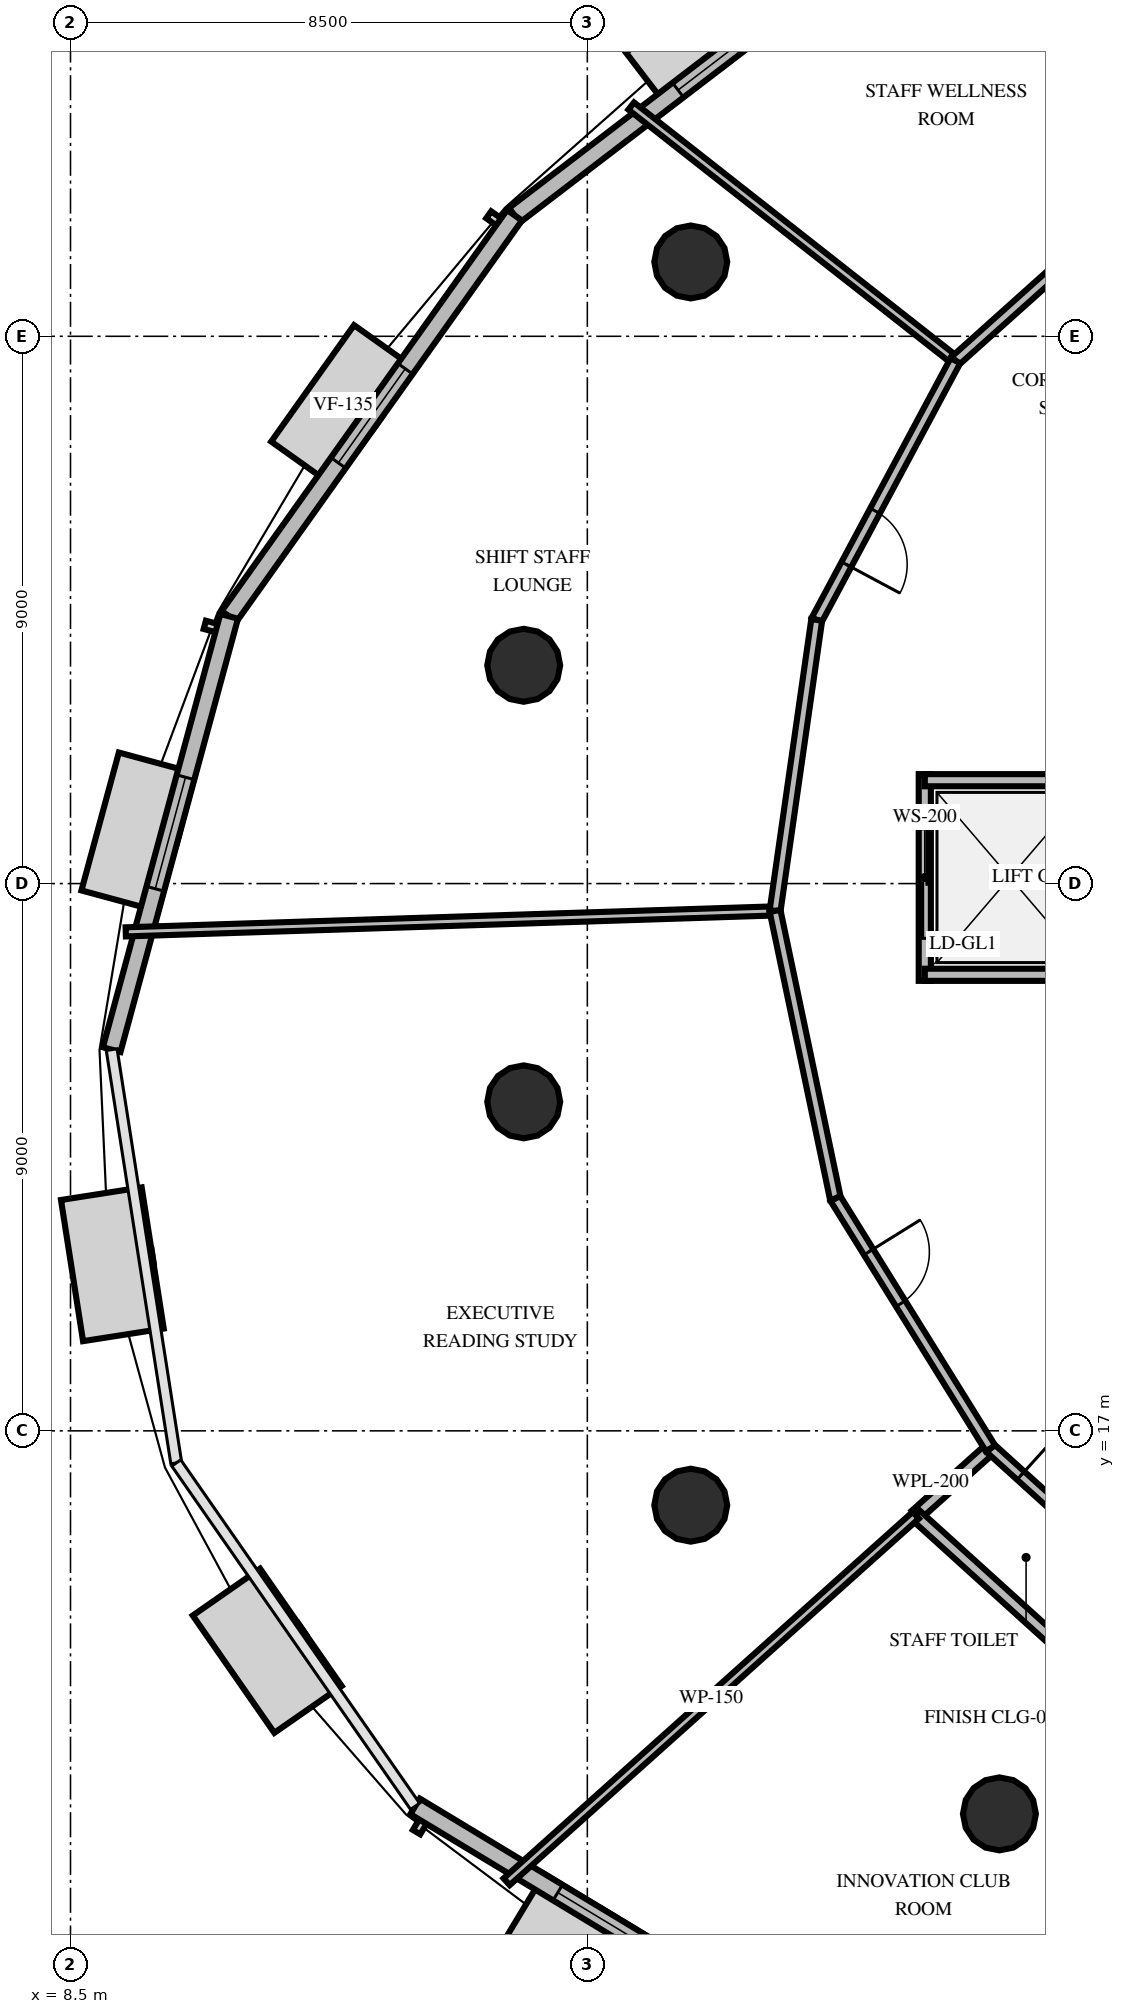
"""IFC4 building model, lengths in metres.
Left out: names, types, materials, properties, quantities, classifications, styles, units other than length and angle.
Written with IfcOpenShell. Run it as: python <this file> out.ifc"""

import sys

from ifc_helpers import new_model, si_unit, direction, frame, frame_2d, origin, origin_2d, place, context, subcontext, project, spatial, rectangle, circle, extrude, element, fill, save


model = new_model("IFC4")
c1 = context("Model", 3, precision=1e-05, world=origin(), true_north=direction((0.0, 1.0)))
c2 = subcontext(c1, "Body", "Model", "MODEL_VIEW")
j1 = project(units=[si_unit("LENGTHUNIT", "METRE"), si_unit("PLANEANGLEUNIT", "RADIAN")], contexts=[c1])
p1 = place(None, origin())
s1 = spatial("IfcSite", under=j1, at=p1, CompositionType="ELEMENT")
p2 = place(p1, origin())
s2 = spatial("IfcBuilding", under=s1, at=p2, CompositionType="ELEMENT")
p3 = place(p2, frame((0.0, 0.0, 125.8)))
s3 = spatial("IfcBuildingStorey", under=s2, at=p3, CompositionType="ELEMENT", Elevation=125.8)
for number, where, z_axis, x_axis in (
    (1, (18.701, 36.222, 0.0), (0.0, 0.0, 1.0), (1.0, 0.0, 0.0)),
    (2, (15.954, 29.59, 0.0), (0.0, 0.0, 1.0), (1.0, 0.0, 0.0)),
    (3, (15.954, 22.41, 0.0), (0.0, 0.0, 1.0), (1.0, 0.0, 0.0)),
    (4, (18.701, 15.778, 0.0), (0.0, 0.0, 1.0), (1.0, 0.0, 0.0)),
    (5, (23.778, 10.701, 0.0), (0.0, 0.0, 1.0), (1.0, 0.0, 0.0)),
):
    element("IfcColumn", number, at=place(p3, frame(where, z_axis=z_axis, x_axis=x_axis)), inside=s3, PredefinedType="COLUMN", context=c2, shape_type="SweptSolid", body=[
        extrude(circle(Radius=0.6, at=origin_2d()), origin(), (0.0, 0.0, 1.0), 4.0),
    ])
p4 = place(p3, frame((22.69, 42.261, 0.0), z_axis=(0.0, 0.0, 1.0), x_axis=(-0.794200404565, -0.607655920229, 0.0)))
e6 = element("IfcWall", 6, at=p4, inside=s3, PredefinedType="SOLIDWALL", context=c2, shape_type="SweptSolid", body=[
    extrude(rectangle(XDim=8.673, YDim=0.3, at=frame_2d((4.336, 0.0))), origin(), (0.0, 0.0, 1.0), 2.9),
])
p5 = place(p4, frame((3.386, 0.0, 0.8)))
e7 = element("IfcOpeningElement", 7, at=p5, cuts=e6, PredefinedType="OPENING", context=c2, shape_type="SweptSolid", body=[
    extrude(rectangle(XDim=1.9, YDim=1.95, at=frame_2d((0.95, 0.975))), frame((0.0, 0.16, 0.0), z_axis=(0.0, -1.0, 0.0), x_axis=(1.0, 0.0, 0.0)), (0.0, 0.0, 1.0), 0.32),
])
p6 = place(p3, frame((15.802, 36.991, 0.0), z_axis=(0.0, 0.0, 1.0), x_axis=(-0.579736538908, -0.814803992047, 0.0)))
e8 = element("IfcWall", 8, at=p6, inside=s3, PredefinedType="SOLIDWALL", context=c2, shape_type="SweptSolid", body=[
    extrude(rectangle(XDim=8.095, YDim=0.3, at=frame_2d((4.047, 0.0))), origin(), (0.0, 0.0, 1.0), 2.9),
])
p7 = place(p6, frame((3.098, 0.0, 0.8)))
e9 = element("IfcOpeningElement", 9, at=p7, cuts=e8, PredefinedType="OPENING", context=c2, shape_type="SweptSolid", body=[
    extrude(rectangle(XDim=1.9, YDim=1.95, at=frame_2d((0.95, 0.975))), frame((0.0, 0.16, 0.0), z_axis=(0.0, -1.0, 0.0), x_axis=(1.0, 0.0, 0.0)), (0.0, 0.0, 1.0), 0.32),
])
p8 = place(p3, frame((11.109, 30.395, 0.0), z_axis=(0.0, 0.0, 1.0), x_axis=(-0.261681809646, -0.965154200374, 0.0)))
e10 = element("IfcWall", 10, at=p8, inside=s3, PredefinedType="SOLIDWALL", context=c2, shape_type="SweptSolid", body=[
    extrude(rectangle(XDim=7.384, YDim=0.3, at=frame_2d((3.692, 0.0))), origin(), (0.0, 0.0, 1.0), 2.9),
])
p9 = place(p8, frame((2.742, 0.0, 0.8)))
e11 = element("IfcOpeningElement", 11, at=p9, cuts=e10, PredefinedType="OPENING", context=c2, shape_type="SweptSolid", body=[
    extrude(rectangle(XDim=1.9, YDim=1.95, at=frame_2d((0.95, 0.975))), frame((0.0, 0.16, 0.0), z_axis=(0.0, -1.0, 0.0), x_axis=(1.0, 0.0, 0.0)), (0.0, 0.0, 1.0), 0.32),
])
p10 = place(p3, frame((14.167, 10.825, 0.0), z_axis=(0.0, 0.0, 1.0), x_axis=(0.856004258132, -0.516968770875, 0.0)))
e12 = element("IfcWall", 12, at=p10, inside=s3, PredefinedType="SOLIDWALL", context=c2, shape_type="SweptSolid", body=[
    extrude(rectangle(XDim=7.383, YDim=0.3, at=frame_2d((3.692, 0.0))), origin(), (0.0, 0.0, 1.0), 2.9),
])
p11 = place(p10, frame((2.742, 0.0, 0.8)))
e13 = element("IfcOpeningElement", 13, at=p11, cuts=e12, PredefinedType="OPENING", context=c2, shape_type="SweptSolid", body=[
    extrude(rectangle(XDim=1.9, YDim=1.95, at=frame_2d((0.95, 0.975))), frame((0.0, 0.16, 0.0), z_axis=(0.0, -1.0, 0.0), x_axis=(1.0, 0.0, 0.0)), (0.0, 0.0, 1.0), 0.32),
])
p12 = place(p3, frame((22.55, 24.4, 0.0), z_axis=(0.0, 0.0, 1.0), x_axis=(0.0, 1.0, 0.0)))
e14 = element("IfcWall", 14, at=p12, inside=s3, PredefinedType="SOLIDWALL", context=c2, shape_type="SweptSolid", body=[
    extrude(rectangle(XDim=3.4, YDim=0.2, at=frame_2d((1.7, 0.0))), origin(), (0.0, 0.0, 1.0), 2.8),
])
p13 = place(p12, frame((0.7, 0.0, 0.0)))
e15 = element("IfcOpeningElement", 15, at=p13, cuts=e14, PredefinedType="OPENING", context=c2, shape_type="SweptSolid", body=[
    extrude(rectangle(XDim=1.8, YDim=2.4, at=frame_2d((0.9, 1.2))), frame((0.0, 0.11, 0.0), z_axis=(0.0, -1.0, 0.0), x_axis=(1.0, 0.0, 0.0)), (0.0, 0.0, 1.0), 0.22),
])
for number, where, z_axis, x_axis in (
    (16, (22.55, 24.5, 0.0), (0.0, 0.0, 1.0), (1.0, 0.0, 0.0)),
    (17, (22.55, 27.7, 0.0), (0.0, 0.0, 1.0), (1.0, 0.0, 0.0)),
):
    element("IfcWall", number, at=place(p3, frame(where, z_axis=z_axis, x_axis=x_axis)), inside=s3, PredefinedType="SOLIDWALL", context=c2, shape_type="SweptSolid", body=[
        extrude(rectangle(XDim=2.8, YDim=0.2, at=frame_2d((1.4, 0.0))), origin(), (0.0, 0.0, 1.0), 2.8),
    ])
p14 = place(p3, frame((23.631, 16.713, 0.0), z_axis=(0.0, 0.0, 1.0), x_axis=(-0.744881296244, -0.667197013262, 0.0)))
e18 = element("IfcWall", 18, at=p14, inside=s3, PredefinedType="PLUMBINGWALL", context=c2, shape_type="SweptSolid", body=[
    extrude(rectangle(XDim=1.65, YDim=0.2, at=frame_2d((0.825, 0.0))), origin(), (0.0, 0.0, 1.0), 2.8),
])
p15 = place(p3, frame((22.402, 15.612, 0.0), z_axis=(0.0, 0.0, 1.0), x_axis=(0.741336734145, -0.671133255477, 0.0)))
e19 = element("IfcWall", 19, at=p15, inside=s3, PredefinedType="PLUMBINGWALL", context=c2, shape_type="SweptSolid", body=[
    extrude(rectangle(XDim=3.255, YDim=0.2, at=frame_2d((1.627, 0.0))), origin(), (0.0, 0.0, 1.0), 2.8),
])
p16 = place(p3, frame((23.631, 16.713, 0.0), z_axis=(0.0, 0.0, 1.0), x_axis=(0.741384706551, -0.671080261141, 0.0)))
e20 = element("IfcWall", 20, at=p16, inside=s3, PredefinedType="PARTITIONING", context=c2, shape_type="SweptSolid", body=[
    extrude(rectangle(XDim=2.91, YDim=0.18, at=frame_2d((1.455, 0.0))), origin(), (0.0, 0.0, 1.0), 2.8),
])
p17 = place(p16, frame((0.669, 0.0, 0.0)))
e21 = element("IfcOpeningElement", 21, at=p17, cuts=e20, PredefinedType="OPENING", context=c2, shape_type="SweptSolid", body=[
    extrude(rectangle(XDim=0.92, YDim=2.1, at=frame_2d((0.46, 1.05))), frame((0.0, 0.1, 0.0), z_axis=(0.0, -1.0, 0.0), x_axis=(1.0, 0.0, 0.0)), (0.0, 0.0, 1.0), 0.2),
])
p18 = place(p3, frame((22.402, 15.612, 0.0), z_axis=(0.0, 0.0, 1.0), x_axis=(-0.744885698321, -0.667192098602, 0.0)))
e22 = element("IfcWall", 22, at=p18, inside=s3, PredefinedType="PARTITIONING", context=c2, shape_type="SweptSolid", body=[
    extrude(rectangle(XDim=9.034, YDim=0.15, at=frame_2d((4.517, 0.0))), origin(), (0.0, 0.0, 1.0), 2.8),
])
p19 = place(p3, frame((23.053, 34.599, 0.0), z_axis=(0.0, 0.0, 1.0), x_axis=(-0.786392054324, 0.61772772068, 0.0)))
e23 = element("IfcWall", 23, at=p19, inside=s3, PredefinedType="PARTITIONING", context=c2, shape_type="SweptSolid", body=[
    extrude(rectangle(XDim=6.78, YDim=0.15, at=frame_2d((3.39, 0.0))), origin(), (0.0, 0.0, 1.0), 2.8),
])
p20 = place(p3, frame((26.655, 37.824, 0.0), z_axis=(0.0, 0.0, 1.0), x_axis=(-0.744874027172, -0.66720512861, 0.0)))
e24 = element("IfcWall", 24, at=p20, inside=s3, PredefinedType="PARTITIONING", context=c2, shape_type="SweptSolid", body=[
    extrude(rectangle(XDim=4.834, YDim=0.18, at=frame_2d((2.417, 0.0))), origin(), (0.0, 0.0, 1.0), 2.8),
])
p21 = place(p3, frame((20.087, 25.551, 0.0), z_axis=(0.0, 0.0, 1.0), x_axis=(-0.999479353963, -0.03226485706, 0.0)))
e25 = element("IfcWall", 25, at=p21, inside=s3, PredefinedType="PARTITIONING", context=c2, shape_type="SweptSolid", body=[
    extrude(rectangle(XDim=10.684, YDim=0.15, at=frame_2d((5.342, 0.0))), origin(), (0.0, 0.0, 1.0), 2.8),
])
p22 = place(p3, frame((23.053, 34.599, 0.0), z_axis=(0.0, 0.0, 1.0), x_axis=(-0.4717883109, -0.881711851853, 0.0)))
e26 = element("IfcWall", 26, at=p22, inside=s3, PredefinedType="PARTITIONING", context=c2, shape_type="SweptSolid", body=[
    extrude(rectangle(XDim=4.834, YDim=0.18, at=frame_2d((2.417, 0.0))), origin(), (0.0, 0.0, 1.0), 2.8),
])
p23 = place(p22, frame((2.801, 0.0, 0.0)))
e27 = element("IfcOpeningElement", 27, at=p23, cuts=e26, PredefinedType="OPENING", context=c2, shape_type="SweptSolid", body=[
    extrude(rectangle(XDim=1.0, YDim=2.15, at=frame_2d((0.5, 1.075))), frame((0.0, 0.1, 0.0), z_axis=(0.0, -1.0, 0.0), x_axis=(1.0, 0.0, 0.0)), (0.0, 0.0, 1.0), 0.2),
])
p24 = place(p3, frame((20.773, 30.336, 0.0), z_axis=(0.0, 0.0, 1.0), x_axis=(-0.141753638595, -0.989901967846, 0.0)))
e28 = element("IfcWall", 28, at=p24, inside=s3, PredefinedType="PARTITIONING", context=c2, shape_type="SweptSolid", body=[
    extrude(rectangle(XDim=4.834, YDim=0.18, at=frame_2d((2.417, 0.0))), origin(), (0.0, 0.0, 1.0), 2.8),
])
p25 = place(p3, frame((20.087, 25.551, 0.0), z_axis=(0.0, 0.0, 1.0), x_axis=(0.205343584518, -0.978689946969, 0.0)))
e29 = element("IfcWall", 29, at=p25, inside=s3, PredefinedType="PARTITIONING", context=c2, shape_type="SweptSolid", body=[
    extrude(rectangle(XDim=4.834, YDim=0.18, at=frame_2d((2.417, 0.0))), origin(), (0.0, 0.0, 1.0), 2.8),
])
p26 = place(p3, frame((21.08, 20.819, 0.0), z_axis=(0.0, 0.0, 1.0), x_axis=(0.527690930955, -0.849436449293, 0.0)))
e30 = element("IfcWall", 30, at=p26, inside=s3, PredefinedType="PARTITIONING", context=c2, shape_type="SweptSolid", body=[
    extrude(rectangle(XDim=4.834, YDim=0.18, at=frame_2d((2.417, 0.0))), origin(), (0.0, 0.0, 1.0), 2.8),
])
p27 = place(p26, frame((1.034, 0.0, 0.0)))
e31 = element("IfcOpeningElement", 31, at=p27, cuts=e30, PredefinedType="OPENING", context=c2, shape_type="SweptSolid", body=[
    extrude(rectangle(XDim=1.0, YDim=2.15, at=frame_2d((0.5, 1.075))), frame((0.0, 0.1, 0.0), z_axis=(0.0, -1.0, 0.0), x_axis=(1.0, 0.0, 0.0)), (0.0, 0.0, 1.0), 0.2),
])
p28 = place(p5, origin())
e32 = element("IfcWindow", 32, at=p28, inside=s3, PartitioningType="SINGLE_PANEL", PredefinedType="WINDOW", context=c2, shape_type="SweptSolid", body=[
    extrude(rectangle(XDim=1.9, YDim=1.95, at=frame_2d((0.95, 0.975))), frame((0.0, 0.03, 0.0), z_axis=(0.0, -1.0, 0.0), x_axis=(1.0, 0.0, 0.0)), (0.0, 0.0, 1.0), 0.06),
])
fill(e7, e32)
p29 = place(p7, origin())
e33 = element("IfcWindow", 33, at=p29, inside=s3, PartitioningType="SINGLE_PANEL", PredefinedType="WINDOW", context=c2, shape_type="SweptSolid", body=[
    extrude(rectangle(XDim=1.9, YDim=1.95, at=frame_2d((0.95, 0.975))), frame((0.0, 0.03, 0.0), z_axis=(0.0, -1.0, 0.0), x_axis=(1.0, 0.0, 0.0)), (0.0, 0.0, 1.0), 0.06),
])
fill(e9, e33)
p30 = place(p9, origin())
e34 = element("IfcWindow", 34, at=p30, inside=s3, PartitioningType="SINGLE_PANEL", PredefinedType="WINDOW", context=c2, shape_type="SweptSolid", body=[
    extrude(rectangle(XDim=1.9, YDim=1.95, at=frame_2d((0.95, 0.975))), frame((0.0, 0.03, 0.0), z_axis=(0.0, -1.0, 0.0), x_axis=(1.0, 0.0, 0.0)), (0.0, 0.0, 1.0), 0.06),
])
fill(e11, e34)
p31 = place(p11, origin())
e35 = element("IfcWindow", 35, at=p31, inside=s3, PartitioningType="SINGLE_PANEL", PredefinedType="WINDOW", context=c2, shape_type="SweptSolid", body=[
    extrude(rectangle(XDim=1.9, YDim=1.95, at=frame_2d((0.95, 0.975))), frame((0.0, 0.03, 0.0), z_axis=(0.0, -1.0, 0.0), x_axis=(1.0, 0.0, 0.0)), (0.0, 0.0, 1.0), 0.06),
])
fill(e13, e35)
p32 = place(p13, origin())
e36 = element("IfcDoor", 36, at=p32, inside=s3, OperationType="DOUBLE_DOOR_SLIDING", PredefinedType="USERDEFINED", context=c2, shape_type="SweptSolid", body=[
    extrude(rectangle(XDim=1.8, YDim=2.4, at=frame_2d((0.9, 1.2))), frame((0.0, 0.025, 0.0), z_axis=(0.0, -1.0, 0.0), x_axis=(1.0, 0.0, 0.0)), (0.0, 0.0, 1.0), 0.05),
])
fill(e15, e36)
p33 = place(p17, origin())
e37 = element("IfcDoor", 37, at=p33, inside=s3, OperationType="SINGLE_SWING_LEFT", PredefinedType="DOOR", context=c2, shape_type="SweptSolid", body=[
    extrude(rectangle(XDim=0.92, YDim=2.1, at=frame_2d((0.46, 1.05))), frame((0.0, 0.025, 0.0), z_axis=(0.0, -1.0, 0.0), x_axis=(1.0, 0.0, 0.0)), (0.0, 0.0, 1.0), 0.05),
])
fill(e21, e37)
p34 = place(p23, origin())
e38 = element("IfcDoor", 38, at=p34, inside=s3, OperationType="SINGLE_SWING_RIGHT", PredefinedType="DOOR", context=c2, shape_type="SweptSolid", body=[
    extrude(rectangle(XDim=1.0, YDim=2.15, at=frame_2d((0.5, 1.075))), frame((0.0, 0.025, 0.0), z_axis=(0.0, -1.0, 0.0), x_axis=(1.0, 0.0, 0.0)), (0.0, 0.0, 1.0), 0.05),
])
fill(e27, e38)
p35 = place(p27, origin())
e39 = element("IfcDoor", 39, at=p35, inside=s3, OperationType="SINGLE_SWING_LEFT", PredefinedType="DOOR", context=c2, shape_type="SweptSolid", body=[
    extrude(rectangle(XDim=1.0, YDim=2.15, at=frame_2d((0.5, 1.075))), frame((0.0, 0.025, 0.0), z_axis=(0.0, -1.0, 0.0), x_axis=(1.0, 0.0, 0.0)), (0.0, 0.0, 1.0), 0.05),
])
fill(e31, e39)
save(model, sys.argv[1])
